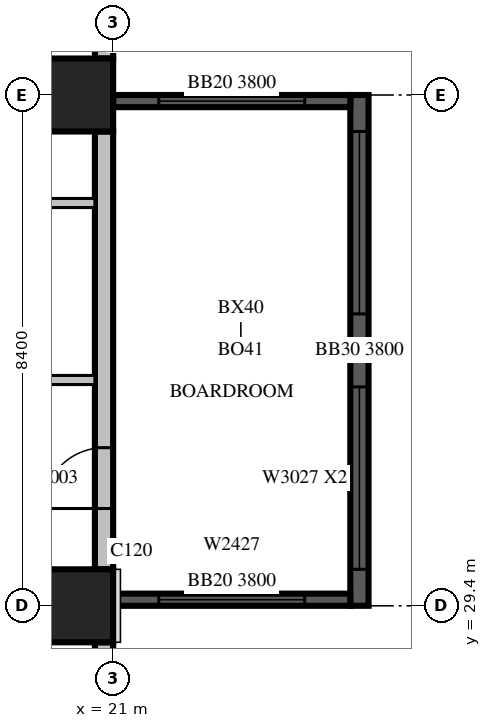
"""IFC4 building model, lengths in metres.
Left out: names, types, materials, properties, quantities, classifications, styles, units other than length and angle.
Written with IfcOpenShell. Run it as: python <this file> out.ifc"""

import sys

from ifc_helpers import new_model, si_unit, direction, frame, frame_2d, origin, origin_2d, place, context, subcontext, project, spatial, rectangle, extrude, source, transform, mapped, element, fill, save


model = new_model("IFC4")
c1 = context("Model", 3, precision=1e-05, world=origin(), true_north=direction((0.0, 1.0)))
c2 = subcontext(c1, "Body", "Model", "MODEL_VIEW")
j1 = project(units=[si_unit("LENGTHUNIT", "METRE"), si_unit("PLANEANGLEUNIT", "RADIAN")], contexts=[c1])
p1 = place(None, origin())
s1 = spatial("IfcSite", under=j1, at=p1, CompositionType="ELEMENT")
p2 = place(p1, origin())
s2 = spatial("IfcBuilding", under=s1, at=p2, CompositionType="ELEMENT")
p3 = place(p2, frame((0.0, 0.0, 95.1)))
s3 = spatial("IfcBuildingStorey", under=s2, at=p3, CompositionType="ELEMENT", Elevation=95.1)
m1 = source(origin(), c2, "Body", "SweptSolid", [
    extrude(rectangle(XDim=1.2, YDim=1.2, at=origin_2d()), origin(), (0.0, 0.0, 1.0), 4.2),
])
for number, where, z_axis, x_axis in (
    (1, (20.4, 29.4, 0.0), (0.0, 0.0, 1.0), (1.0, 0.0, 0.0)),
    (2, (20.4, 37.8, 0.0), (0.0, 0.0, 1.0), (1.0, 0.0, 0.0)),
):
    element("IfcColumn", number, at=place(p3, frame(where, z_axis=z_axis, x_axis=x_axis)), inside=s3, PredefinedType="COLUMN", context=c2, shape_type="MappedRepresentation", body=[
        mapped(m1, transform((0.0, 0.0, 0.0), scale=1.0)),
    ])
m2 = source(origin(), c2, "Body", "SweptSolid", [
    extrude(rectangle(XDim=8.4, YDim=0.3, at=frame_2d((4.2, 0.0))), origin(), (0.0, 0.0, 1.0), 3.8),
])
p4 = place(p3, frame((25.05, 29.4, 0.0), z_axis=(0.0, 0.0, 1.0), x_axis=(0.0, 1.0, 0.0)))
e3 = element("IfcWall", 3, at=p4, inside=s3, PredefinedType="SOLIDWALL", context=c2, shape_type="MappedRepresentation", body=[
    mapped(m2, transform((0.0, 0.0, 0.0), scale=1.0)),
])
m3 = source(origin(), c2, "Body", "SweptSolid", [
    extrude(rectangle(XDim=3.0, YDim=2.7, at=frame_2d((1.5, 1.35))), frame((0.0, 0.16, 0.0), z_axis=(0.0, -1.0, 0.0), x_axis=(1.0, 0.0, 0.0)), (0.0, 0.0, 1.0), 0.32),
])
p5 = place(p4, frame((0.6, 0.0, 0.6)))
e4 = element("IfcOpeningElement", 4, at=p5, cuts=e3, PredefinedType="OPENING", context=c2, shape_type="MappedRepresentation", body=[
    mapped(m3, transform((0.0, 0.0, 0.0), scale=1.0)),
])
p6 = place(p4, frame((4.8, 0.0, 0.6)))
e5 = element("IfcOpeningElement", 5, at=p6, cuts=e3, PredefinedType="OPENING", context=c2, shape_type="MappedRepresentation", body=[
    mapped(m3, transform((0.0, 0.0, 0.0), scale=1.0)),
])
m4 = source(origin(), c2, "Body", "SweptSolid", [
    extrude(rectangle(XDim=3.9, YDim=0.2, at=frame_2d((1.95, 0.0))), origin(), (0.0, 0.0, 1.0), 3.8),
])
p7 = place(p3, frame((21.0, 29.5, 0.0), z_axis=(0.0, 0.0, 1.0), x_axis=(1.0, 0.0, 0.0)))
e6 = element("IfcWall", 6, at=p7, inside=s3, PredefinedType="SOLIDWALL", context=c2, shape_type="MappedRepresentation", body=[
    mapped(m4, transform((0.0, 0.0, 0.0), scale=1.0)),
])
m5 = source(origin(), c2, "Body", "SweptSolid", [
    extrude(rectangle(XDim=2.4, YDim=2.7, at=frame_2d((1.2, 1.35))), frame((0.0, 0.11, 0.0), z_axis=(0.0, -1.0, 0.0), x_axis=(1.0, 0.0, 0.0)), (0.0, 0.0, 1.0), 0.22),
])
p8 = place(p7, frame((0.75, 0.0, 0.6)))
e7 = element("IfcOpeningElement", 7, at=p8, cuts=e6, PredefinedType="OPENING", context=c2, shape_type="MappedRepresentation", body=[
    mapped(m5, transform((0.0, 0.0, 0.0), scale=1.0)),
])
p9 = place(p3, frame((21.0, 37.7, 0.0), z_axis=(0.0, 0.0, 1.0), x_axis=(1.0, 0.0, 0.0)))
e8 = element("IfcWall", 8, at=p9, inside=s3, PredefinedType="SOLIDWALL", context=c2, shape_type="MappedRepresentation", body=[
    mapped(m4, transform((0.0, 0.0, 0.0), scale=1.0)),
])
p10 = place(p9, frame((0.75, 0.0, 0.6)))
e9 = element("IfcOpeningElement", 9, at=p10, cuts=e8, PredefinedType="OPENING", context=c2, shape_type="MappedRepresentation", body=[
    mapped(m5, transform((0.0, 0.0, 0.0), scale=1.0)),
])
m6 = source(origin(), c2, "Body", "SweptSolid", [
    extrude(rectangle(XDim=6.6, YDim=0.3, at=frame_2d((3.3, 0.0))), origin(), (0.0, 0.0, 1.0), 3.8),
])
p11 = place(p3, frame((20.85, 22.2, 0.0), z_axis=(0.0, 0.0, 1.0), x_axis=(0.0, 1.0, 0.0)))
e10 = element("IfcWall", 10, at=p11, inside=s3, PredefinedType="STANDARD", context=c2, shape_type="MappedRepresentation", body=[
    mapped(m6, transform((0.0, 0.0, 0.0), scale=1.0)),
])
m7 = source(origin(), c2, "Body", "SweptSolid", [
    extrude(rectangle(XDim=1.2, YDim=2.7, at=frame_2d((0.6, 1.35))), frame((0.0, 0.16, 0.0), z_axis=(0.0, -1.0, 0.0), x_axis=(1.0, 0.0, 0.0)), (0.0, 0.0, 1.0), 0.32),
])
p12 = place(p11, frame((0.3, 0.0, 0.6)))
e11 = element("IfcOpeningElement", 11, at=p12, cuts=e10, PredefinedType="OPENING", context=c2, shape_type="MappedRepresentation", body=[
    mapped(m7, transform((0.0, 0.0, 0.0), scale=1.0)),
])
m8 = source(origin(), c2, "Body", "SweptSolid", [
    extrude(rectangle(XDim=2.4, YDim=2.7, at=frame_2d((1.2, 1.35))), frame((0.0, 0.16, 0.0), z_axis=(0.0, -1.0, 0.0), x_axis=(1.0, 0.0, 0.0)), (0.0, 0.0, 1.0), 0.32),
])
p13 = place(p11, frame((3.9, 0.0, 0.6)))
e12 = element("IfcOpeningElement", 12, at=p13, cuts=e10, PredefinedType="OPENING", context=c2, shape_type="MappedRepresentation", body=[
    mapped(m8, transform((0.0, 0.0, 0.0), scale=1.0)),
])
m9 = source(origin(), c2, "Body", "SweptSolid", [
    extrude(rectangle(XDim=7.2, YDim=0.3, at=frame_2d((3.6, 0.0))), origin(), (0.0, 0.0, 1.0), 3.8),
])
p14 = place(p3, frame((20.85, 30.0, 0.0), z_axis=(0.0, 0.0, 1.0), x_axis=(0.0, 1.0, 0.0)))
e13 = element("IfcWall", 13, at=p14, inside=s3, PredefinedType="STANDARD", context=c2, shape_type="MappedRepresentation", body=[
    mapped(m9, transform((0.0, 0.0, 0.0), scale=1.0)),
])
m10 = source(origin(), c2, "Body", "SweptSolid", [
    extrude(rectangle(XDim=1.0, YDim=2.1, at=frame_2d((0.5, 1.05))), frame((0.0, 0.16, 0.0), z_axis=(0.0, -1.0, 0.0), x_axis=(1.0, 0.0, 0.0)), (0.0, 0.0, 1.0), 0.32),
])
p15 = place(p14, frame((1.0, 0.0, 0.0)))
e14 = element("IfcOpeningElement", 14, at=p15, cuts=e13, PredefinedType="OPENING", context=c2, shape_type="MappedRepresentation", body=[
    mapped(m10, transform((0.0, 0.0, 0.0), scale=1.0)),
])
p16 = place(p3, frame((20.85, 38.4, 0.0), z_axis=(0.0, 0.0, 1.0), x_axis=(0.0, 1.0, 0.0)))
e15 = element("IfcWall", 15, at=p16, inside=s3, PredefinedType="STANDARD", context=c2, shape_type="MappedRepresentation", body=[
    mapped(m9, transform((0.0, 0.0, 0.0), scale=1.0)),
])
p17 = place(p16, frame((0.3, 0.0, 0.6)))
e16 = element("IfcOpeningElement", 16, at=p17, cuts=e15, PredefinedType="OPENING", context=c2, shape_type="MappedRepresentation", body=[
    mapped(m8, transform((0.0, 0.0, 0.0), scale=1.0)),
])
p18 = place(p16, frame((4.5, 0.0, 0.6)))
e17 = element("IfcOpeningElement", 17, at=p18, cuts=e15, PredefinedType="OPENING", context=c2, shape_type="MappedRepresentation", body=[
    mapped(m8, transform((0.0, 0.0, 0.0), scale=1.0)),
])
m11 = source(origin(), c2, "Body", "SweptSolid", [
    extrude(rectangle(XDim=3.6, YDim=0.15, at=frame_2d((1.8, 0.0))), origin(), (0.0, 0.0, 1.0), 3.8),
])
for number, where, z_axis, x_axis in (
    (18, (17.1, 33.113, 0.0), (0.0, 0.0, 1.0), (1.0, 0.0, 0.0)),
    (19, (17.1, 36.024, 0.0), (0.0, 0.0, 1.0), (1.0, 0.0, 0.0)),
):
    element("IfcWall", number, at=place(p3, frame(where, z_axis=z_axis, x_axis=x_axis)), inside=s3, PredefinedType="PARTITIONING", context=c2, shape_type="MappedRepresentation", body=[
        mapped(m11, transform((0.0, 0.0, 0.0), scale=1.0)),
    ])
m12 = source(origin(), c2, "Body", "SweptSolid", [
    extrude(rectangle(XDim=3.0, YDim=2.7, at=frame_2d((1.5, 1.35))), frame((0.0, 0.03, 0.0), z_axis=(0.0, -1.0, 0.0), x_axis=(1.0, 0.0, 0.0)), (0.0, 0.0, 1.0), 0.06),
])
p19 = place(p5, origin())
e20 = element("IfcWindow", 20, at=p19, inside=s3, PartitioningType="SINGLE_PANEL", PredefinedType="WINDOW", context=c2, shape_type="MappedRepresentation", body=[
    mapped(m12, transform((0.0, 0.0, 0.0), scale=1.0)),
])
fill(e4, e20)
p20 = place(p6, origin())
e21 = element("IfcWindow", 21, at=p20, inside=s3, PartitioningType="SINGLE_PANEL", PredefinedType="WINDOW", context=c2, shape_type="MappedRepresentation", body=[
    mapped(m12, transform((0.0, 0.0, 0.0), scale=1.0)),
])
fill(e5, e21)
m13 = source(origin(), c2, "Body", "SweptSolid", [
    extrude(rectangle(XDim=2.4, YDim=2.7, at=frame_2d((1.2, 1.35))), frame((0.0, 0.03, 0.0), z_axis=(0.0, -1.0, 0.0), x_axis=(1.0, 0.0, 0.0)), (0.0, 0.0, 1.0), 0.06),
])
p21 = place(p8, origin())
e22 = element("IfcWindow", 22, at=p21, inside=s3, PartitioningType="SINGLE_PANEL", PredefinedType="WINDOW", context=c2, shape_type="MappedRepresentation", body=[
    mapped(m13, transform((0.0, 0.0, 0.0), scale=1.0)),
])
fill(e7, e22)
p22 = place(p10, origin())
e23 = element("IfcWindow", 23, at=p22, inside=s3, PartitioningType="SINGLE_PANEL", PredefinedType="WINDOW", context=c2, shape_type="MappedRepresentation", body=[
    mapped(m13, transform((0.0, 0.0, 0.0), scale=1.0)),
])
fill(e9, e23)
m14 = source(origin(), c2, "Body", "SweptSolid", [
    extrude(rectangle(XDim=1.0, YDim=2.1, at=frame_2d((0.5, 1.05))), frame((0.0, 0.025, 0.0), z_axis=(0.0, -1.0, 0.0), x_axis=(1.0, 0.0, 0.0)), (0.0, 0.0, 1.0), 0.05),
])
p23 = place(p15, origin())
e24 = element("IfcDoor", 24, at=p23, inside=s3, OperationType="SINGLE_SWING_LEFT", PredefinedType="DOOR", context=c2, shape_type="MappedRepresentation", body=[
    mapped(m14, transform((0.0, 0.0, 0.0), scale=1.0)),
])
fill(e14, e24)
save(model, sys.argv[1])
